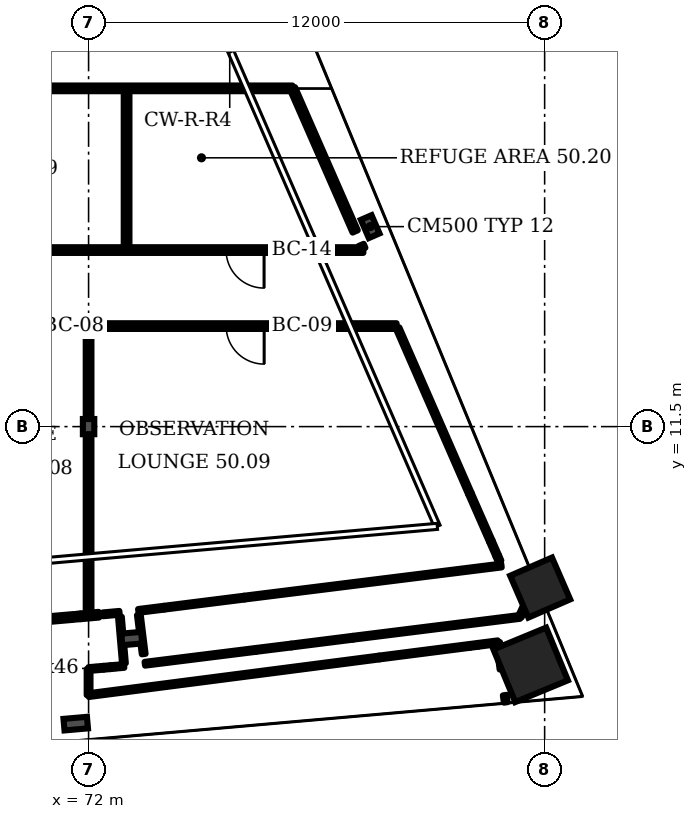
"""IFC4 building model, lengths in metres.
Left out: names, types, materials, properties, quantities, classifications, styles, units other than length and angle.
Written with IfcOpenShell. Run it as: python <this file> out.ifc"""

import sys

from ifc_helpers import new_model, si_unit, direction, frame, frame_2d, origin, origin_2d, place, context, subcontext, project, spatial, rectangle, i_section, extrude, element, fill, save


model = new_model("IFC4")
c1 = context("Model", 3, precision=1e-05, world=origin(), true_north=direction((0.0, 1.0)))
c2 = subcontext(c1, "Body", "Model", "MODEL_VIEW")
j1 = project(units=[si_unit("LENGTHUNIT", "METRE"), si_unit("PLANEANGLEUNIT", "RADIAN")], contexts=[c1])
p1 = place(None, origin())
s1 = spatial("IfcSite", under=j1, at=p1, CompositionType="ELEMENT")
p2 = place(p1, origin())
s2 = spatial("IfcBuilding", under=s1, at=p2, CompositionType="ELEMENT")
p3 = place(p2, frame((0.0, 0.0, 202.3)))
s3 = spatial("IfcBuildingStorey", under=s2, at=p3, CompositionType="ELEMENT", Elevation=202.3)
p4 = place(p3, frame((83.883, 7.265, 0.0), z_axis=(0.0, 0.0, 1.0), x_axis=(-0.398727, 0.917072, 0.0)))
e1 = element("IfcColumn", 1, at=p4, inside=s3, PredefinedType="COLUMN", context=c2, shape_type="SweptSolid", body=[
    extrude(rectangle(XDim=1.2, YDim=1.2, at=origin_2d()), origin(), (0.0, 0.0, 1.0), 4.8),
])
for number, where, z_axis, x_axis in (
    (2, (73.135, 5.923, 0.0), (0.0, 0.0, 1.0), (0.087, -0.996, 0.0)),
    (3, (79.41, 16.762, 0.0), (0.0, 0.0, 1.0), (0.917, 0.399, 0.0)),
):
    element("IfcColumn", number, at=place(p3, frame(where, z_axis=z_axis, x_axis=x_axis)), inside=s3, PredefinedType="COLUMN", context=c2, shape_type="SweptSolid", body=[
        extrude(i_section(OverallWidth=0.306, OverallDepth=0.524, WebThickness=0.021, FlangeThickness=0.04, FilletRadius=0.027, at=origin_2d()), origin(), (0.0, 0.0, 1.0), 4.8),
    ])
p5 = place(p3, frame((72.0, 11.5, 0.0), z_axis=(0.0, 0.0, 1.0), x_axis=(1.0, 0.0, 0.0)))
e4 = element("IfcColumn", 4, at=p5, inside=s3, PredefinedType="COLUMN", context=c2, shape_type="SweptSolid", body=[
    extrude(i_section(OverallWidth=0.3, OverallDepth=0.4, WebThickness=0.013, FlangeThickness=0.024, FilletRadius=0.027, at=origin_2d()), origin(), (0.0, 0.0, 1.0), 4.8),
])
p6 = place(p3, frame((83.633, 5.231, 0.0), z_axis=(0.0, 0.0, 1.0), x_axis=(-0.381602, 0.924325, 0.0)))
e5 = element("IfcColumn", 5, at=p6, inside=s3, PredefinedType="COLUMN", context=c2, shape_type="SweptSolid", body=[
    extrude(rectangle(XDim=1.5, YDim=1.5, at=origin_2d()), origin(), (0.0, 0.0, 1.0), 4.8),
])
p7 = place(p3, frame((71.662, 3.685, 0.0), z_axis=(0.0, 0.0, 1.0), x_axis=(0.087156, -0.996198, 0.0)))
e6 = element("IfcColumn", 6, at=p7, inside=s3, PredefinedType="COLUMN", context=c2, shape_type="SweptSolid", body=[
    extrude(i_section(OverallWidth=0.305, OverallDepth=0.62, WebThickness=0.021, FlangeThickness=0.04, FilletRadius=0.027, at=origin_2d()), origin(), (0.0, 0.0, 1.0), 4.8),
])
p8 = place(p3, frame((63.905, 16.145, 0.0), z_axis=(0.0, 0.0, 1.0), x_axis=(1.0, 0.0, 0.0)))
e7 = element("IfcWall", 7, at=p8, inside=s3, PredefinedType="PARTITIONING", context=c2, shape_type="SweptSolid", body=[
    extrude(rectangle(XDim=15.325, YDim=0.15, at=frame_2d((7.662, 0.0))), origin(), (0.0, 0.0, 1.0), 4.4),
])
p9 = place(p8, frame((1.795, 0.0, 0.0)))
e8 = element("IfcOpeningElement", 8, at=p9, cuts=e7, PredefinedType="OPENING", context=c2, shape_type="SweptSolid", body=[
    extrude(rectangle(XDim=1.0, YDim=2.1, at=frame_2d((0.5, 1.05))), frame((0.0, 0.085, 0.0), z_axis=(0.0, -1.0, 0.0), x_axis=(1.0, 0.0, 0.0)), (0.0, 0.0, 1.0), 0.17),
])
p10 = place(p8, frame((11.713, 0.0, 0.0)))
e9 = element("IfcOpeningElement", 9, at=p10, cuts=e7, PredefinedType="OPENING", context=c2, shape_type="SweptSolid", body=[
    extrude(rectangle(XDim=1.0, YDim=2.1, at=frame_2d((0.5, 1.05))), frame((0.0, 0.085, 0.0), z_axis=(0.0, -1.0, 0.0), x_axis=(1.0, 0.0, 0.0)), (0.0, 0.0, 1.0), 0.17),
])
p11 = place(p3, frame((63.905, 20.4, 0.0), z_axis=(0.0, 0.0, 1.0), x_axis=(1.0, 0.0, 0.0)))
e10 = element("IfcWall", 10, at=p11, inside=s3, PredefinedType="PARTITIONING", context=c2, shape_type="SweptSolid", body=[
    extrude(rectangle(XDim=13.46, YDim=0.15, at=frame_2d((6.73, 0.0))), origin(), (0.0, 0.0, 1.0), 4.4),
])
p12 = place(p3, frame((68.214, 14.145, 0.0), z_axis=(0.0, 0.0, 1.0), x_axis=(1.0, 0.0, 0.0)))
e11 = element("IfcWall", 11, at=p12, inside=s3, PredefinedType="PARTITIONING", context=c2, shape_type="SweptSolid", body=[
    extrude(rectangle(XDim=11.891, YDim=0.15, at=frame_2d((5.946, 0.0))), origin(), (0.0, 0.0, 1.0), 4.4),
])
p13 = place(p12, frame((1.401, 0.0, 0.0)))
e12 = element("IfcOpeningElement", 12, at=p13, cuts=e11, PredefinedType="OPENING", context=c2, shape_type="SweptSolid", body=[
    extrude(rectangle(XDim=1.0, YDim=2.1, at=frame_2d((0.5, 1.05))), frame((0.0, 0.085, 0.0), z_axis=(0.0, -1.0, 0.0), x_axis=(1.0, 0.0, 0.0)), (0.0, 0.0, 1.0), 0.17),
])
p14 = place(p12, frame((7.406, 0.0, 0.0)))
e13 = element("IfcOpeningElement", 13, at=p14, cuts=e11, PredefinedType="OPENING", context=c2, shape_type="SweptSolid", body=[
    extrude(rectangle(XDim=1.0, YDim=2.1, at=frame_2d((0.5, 1.05))), frame((0.0, 0.085, 0.0), z_axis=(0.0, -1.0, 0.0), x_axis=(1.0, 0.0, 0.0)), (0.0, 0.0, 1.0), 0.17),
])
p15 = place(p3, frame((70.489, 6.395, 0.0), z_axis=(0.0, 0.0, 1.0), x_axis=(0.996196, 0.087119, 0.0)))
e14 = element("IfcWall", 14, at=p15, inside=s3, PredefinedType="PARTITIONING", context=c2, shape_type="SweptSolid", body=[
    extrude(rectangle(XDim=1.141, YDim=0.15, at=frame_2d((0.57, 0.0))), origin(), (0.0, 0.0, 1.0), 4.4),
])
p16 = place(p3, frame((71.68, 6.5, 0.0), z_axis=(0.0, 0.0, 1.0), x_axis=(0.997064, 0.076524, 0.0)))
e15 = element("IfcWall", 15, at=p16, inside=s3, PredefinedType="PARTITIONING", context=c2, shape_type="SweptSolid", body=[
    extrude(rectangle(XDim=0.108, YDim=0.15, at=frame_2d((0.054, 0.0))), origin(), (0.0, 0.0, 1.0), 4.4),
])
p17 = place(p3, frame((71.788, 6.508, 0.0), z_axis=(0.0, 0.0, 1.0), x_axis=(0.996212, 0.086911, 0.0)))
e16 = element("IfcWall", 16, at=p17, inside=s3, PredefinedType="PARTITIONING", context=c2, shape_type="SweptSolid", body=[
    extrude(rectangle(XDim=0.486, YDim=0.15, at=frame_2d((0.243, 0.0))), origin(), (0.0, 0.0, 1.0), 4.4),
])
p18 = place(p3, frame((72.0, 4.435, 0.0), z_axis=(0.0, 0.0, 1.0), x_axis=(0.991735, 0.128315, 0.0)))
e17 = element("IfcWall", 17, at=p18, inside=s3, PredefinedType="PARTITIONING", context=c2, shape_type="SweptSolid", body=[
    extrude(rectangle(XDim=7.713, YDim=0.1, at=frame_2d((3.857, 0.0))), origin(), (0.0, 0.0, 1.0), 4.4),
])
p19 = place(p3, frame((72.0, 4.435, 0.0), z_axis=(0.0, 0.0, 1.0), x_axis=(0.0, 1.0, 0.0)))
e18 = element("IfcWall", 18, at=p19, inside=s3, PredefinedType="PARTITIONING", context=c2, shape_type="SweptSolid", body=[
    extrude(rectangle(XDim=0.685, YDim=0.1, at=frame_2d((0.343, 0.0))), origin(), (0.0, 0.0, 1.0), 4.4),
])
p20 = place(p3, frame((72.0, 5.12, 0.0), z_axis=(0.0, 0.0, 1.0), x_axis=(0.996121, 0.088038, 0.0)))
e19 = element("IfcWall", 19, at=p20, inside=s3, PredefinedType="PARTITIONING", context=c2, shape_type="SweptSolid", body=[
    extrude(rectangle(XDim=0.396, YDim=0.1, at=frame_2d((0.198, 0.0))), origin(), (0.0, 0.0, 1.0), 4.4),
])
p21 = place(p3, frame((72.0, 6.527, 0.0), z_axis=(0.0, 0.0, 1.0), x_axis=(0.0, 1.0, 0.0)))
e20 = element("IfcWall", 20, at=p21, inside=s3, PredefinedType="PARTITIONING", context=c2, shape_type="SweptSolid", body=[
    extrude(rectangle(XDim=7.618, YDim=0.15, at=frame_2d((3.809, 0.0))), origin(), (0.0, 0.0, 1.0), 4.4),
])
p22 = place(p3, frame((72.375, 6.56, 0.0), z_axis=(0.0, 0.0, 1.0), x_axis=(0.99588, 0.090635, 0.0)))
e21 = element("IfcWall", 21, at=p22, inside=s3, PredefinedType="PARTITIONING", context=c2, shape_type="SweptSolid", body=[
    extrude(rectangle(XDim=0.442, YDim=0.1, at=frame_2d((0.221, 0.0))), origin(), (0.0, 0.0, 1.0), 4.4),
])
p23 = place(p3, frame((72.395, 5.155, 0.0), z_axis=(0.0, 0.0, 1.0), x_axis=(0.996593, 0.082486, 0.0)))
e22 = element("IfcWall", 22, at=p23, inside=s3, PredefinedType="PARTITIONING", context=c2, shape_type="SweptSolid", body=[
    extrude(rectangle(XDim=0.181, YDim=0.1, at=frame_2d((0.09, 0.0))), origin(), (0.0, 0.0, 1.0), 4.4),
])
p24 = place(p3, frame((72.575, 5.17, 0.0), z_axis=(0.0, 0.0, 1.0), x_axis=(0.996069, 0.088603, 0.0)))
e23 = element("IfcWall", 23, at=p24, inside=s3, PredefinedType="PARTITIONING", context=c2, shape_type="SweptSolid", body=[
    extrude(rectangle(XDim=0.171, YDim=0.1, at=frame_2d((0.085, 0.0))), origin(), (0.0, 0.0, 1.0), 4.4),
])
p25 = place(p3, frame((72.796, 5.191, 0.0), z_axis=(0.0, 0.0, 1.0), x_axis=(0.996205, 0.087081, 0.0)))
e24 = element("IfcWall", 24, at=p25, inside=s3, PredefinedType="PARTITIONING", context=c2, shape_type="SweptSolid", body=[
    extrude(rectangle(XDim=0.14, YDim=0.1, at=frame_2d((0.07, 0.0))), origin(), (0.0, 0.0, 1.0), 4.4),
])
p26 = place(p3, frame((72.93, 5.27, 0.0), z_axis=(0.0, 0.0, 1.0), x_axis=(-0.085711, 0.996316, 0.0)))
e25 = element("IfcWall", 25, at=p26, inside=s3, PredefinedType="PARTITIONING", context=c2, shape_type="SweptSolid", body=[
    extrude(rectangle(XDim=1.228, YDim=0.1, at=frame_2d((0.614, 0.0))), origin(), (0.0, 0.0, 1.0), 4.4),
])
p27 = place(p3, frame((73.0, 16.145, 0.0), z_axis=(0.0, 0.0, 1.0), x_axis=(0.0, 1.0, 0.0)))
e26 = element("IfcWall", 26, at=p27, inside=s3, PredefinedType="PARTITIONING", context=c2, shape_type="SweptSolid", body=[
    extrude(rectangle(XDim=4.255, YDim=0.15, at=frame_2d((2.127, 0.0))), origin(), (0.0, 0.0, 1.0), 4.4),
])
p28 = place(p3, frame((73.309, 6.65, 0.0), z_axis=(0.0, 0.0, 1.0), x_axis=(0.99228, 0.124035, 0.0)))
e27 = element("IfcWall", 27, at=p28, inside=s3, PredefinedType="PARTITIONING", context=c2, shape_type="SweptSolid", body=[
    extrude(rectangle(XDim=0.679, YDim=0.1, at=frame_2d((0.339, 0.0))), origin(), (0.0, 0.0, 1.0), 4.4),
])
p29 = place(p3, frame((73.45, 5.515, 0.0), z_axis=(0.0, 0.0, 1.0), x_axis=(-0.122241, 0.992503, 0.0)))
e28 = element("IfcWall", 28, at=p29, inside=s3, PredefinedType="PARTITIONING", context=c2, shape_type="SweptSolid", body=[
    extrude(rectangle(XDim=1.039, YDim=0.1, at=frame_2d((0.519, 0.0))), origin(), (0.0, 0.0, 1.0), 4.4),
])
p30 = place(p3, frame((73.48, 5.26, 0.0), z_axis=(0.0, 0.0, 1.0), x_axis=(0.992307, 0.123821, 0.0)))
e29 = element("IfcWall", 29, at=p30, inside=s3, PredefinedType="PARTITIONING", context=c2, shape_type="SweptSolid", body=[
    extrude(rectangle(XDim=2.948, YDim=0.1, at=frame_2d((1.474, 0.0))), origin(), (0.0, 0.0, 1.0), 4.4),
])
p31 = place(p3, frame((73.983, 6.735, 0.0), z_axis=(0.0, 0.0, 1.0), x_axis=(0.992202, 0.124656, 0.0)))
e30 = element("IfcWall", 30, at=p31, inside=s3, PredefinedType="PARTITIONING", context=c2, shape_type="SweptSolid", body=[
    extrude(rectangle(XDim=2.129, YDim=0.1, at=frame_2d((1.064, 0.0))), origin(), (0.0, 0.0, 1.0), 4.4),
])
p32 = place(p3, frame((76.095, 7.0, 0.0), z_axis=(0.0, 0.0, 1.0), x_axis=(0.992304, 0.123792, 0.0)))
e31 = element("IfcWall", 31, at=p32, inside=s3, PredefinedType="PARTITIONING", context=c2, shape_type="SweptSolid", body=[
    extrude(rectangle(XDim=6.822, YDim=0.1, at=frame_2d((3.411, 0.0))), origin(), (0.0, 0.0, 1.0), 4.4),
])
p33 = place(p3, frame((76.405, 5.625, 0.0), z_axis=(0.0, 0.0, 1.0), x_axis=(0.992443, 0.12272, 0.0)))
e32 = element("IfcWall", 32, at=p33, inside=s3, PredefinedType="PARTITIONING", context=c2, shape_type="SweptSolid", body=[
    extrude(rectangle(XDim=0.937, YDim=0.1, at=frame_2d((0.469, 0.0))), origin(), (0.0, 0.0, 1.0), 4.4),
])
p34 = place(p3, frame((77.335, 5.74, 0.0), z_axis=(0.0, 0.0, 1.0), x_axis=(0.992138, 0.125156, 0.0)))
e33 = element("IfcWall", 33, at=p34, inside=s3, PredefinedType="PARTITIONING", context=c2, shape_type="SweptSolid", body=[
    extrude(rectangle(XDim=1.635, YDim=0.1, at=frame_2d((0.817, 0.0))), origin(), (0.0, 0.0, 1.0), 4.4),
])
p35 = place(p3, frame((78.957, 5.945, 0.0), z_axis=(0.0, 0.0, 1.0), x_axis=(0.992303, 0.123831, 0.0)))
e34 = element("IfcWall", 34, at=p35, inside=s3, PredefinedType="PARTITIONING", context=c2, shape_type="SweptSolid", body=[
    extrude(rectangle(XDim=4.426, YDim=0.1, at=frame_2d((2.213, 0.0))), origin(), (0.0, 0.0, 1.0), 4.4),
])
p36 = place(p3, frame((79.015, 16.635, 0.0), z_axis=(0.0, 0.0, 1.0), x_axis=(-0.401383, 0.915911, 0.0)))
e35 = element("IfcWall", 35, at=p36, inside=s3, PredefinedType="PARTITIONING", context=c2, shape_type="SweptSolid", body=[
    extrude(rectangle(XDim=4.111, YDim=0.15, at=frame_2d((2.055, 0.0))), origin(), (0.0, 0.0, 1.0), 4.4),
])
p37 = place(p3, frame((79.215, 16.175, 0.0), z_axis=(0.0, 0.0, 1.0), x_axis=(-0.395209, 0.918594, 0.0)))
e36 = element("IfcWall", 36, at=p37, inside=s3, PredefinedType="PARTITIONING", context=c2, shape_type="SweptSolid", body=[
    extrude(rectangle(XDim=0.114, YDim=0.15, at=frame_2d((0.057, 0.0))), origin(), (0.0, 0.0, 1.0), 4.4),
])
p38 = place(p3, frame((79.65, 5.425, 0.0), z_axis=(0.0, 0.0, 1.0), x_axis=(0.991892, 0.127077, 0.0)))
e37 = element("IfcWall", 37, at=p38, inside=s3, PredefinedType="PARTITIONING", context=c2, shape_type="SweptSolid", body=[
    extrude(rectangle(XDim=2.4, YDim=0.1, at=frame_2d((1.2, 0.0))), origin(), (0.0, 0.0, 1.0), 4.4),
])
p39 = place(p3, frame((82.03, 5.73, 0.0), z_axis=(0.0, 0.0, 1.0), x_axis=(0.991935, 0.126723, 0.0)))
e38 = element("IfcWall", 38, at=p39, inside=s3, PredefinedType="PARTITIONING", context=c2, shape_type="SweptSolid", body=[
    extrude(rectangle(XDim=0.223, YDim=0.1, at=frame_2d((0.112, 0.0))), origin(), (0.0, 0.0, 1.0), 4.4),
])
p40 = place(p3, frame((82.03, 9.745, 0.0), z_axis=(0.0, 0.0, 1.0), x_axis=(-0.400291, 0.916392, 0.0)))
e39 = element("IfcWall", 39, at=p40, inside=s3, PredefinedType="PARTITIONING", context=c2, shape_type="SweptSolid", body=[
    extrude(rectangle(XDim=4.743, YDim=0.1, at=frame_2d((2.372, 0.0))), origin(), (0.0, 0.0, 1.0), 4.4),
])
p41 = place(p3, frame((82.252, 5.758, 0.0), z_axis=(0.0, 0.0, 1.0), x_axis=(0.991798, 0.127809, 0.0)))
e40 = element("IfcWall", 40, at=p41, inside=s3, PredefinedType="PARTITIONING", context=c2, shape_type="SweptSolid", body=[
    extrude(rectangle(XDim=0.525, YDim=0.1, at=frame_2d((0.263, 0.0))), origin(), (0.0, 0.0, 1.0), 4.4),
])
p42 = place(p3, frame((82.583, 8.488, 0.0), z_axis=(0.0, 0.0, 1.0), x_axis=(-0.402589, 0.915379, 0.0)))
e41 = element("IfcWall", 41, at=p42, inside=s3, PredefinedType="PARTITIONING", context=c2, shape_type="SweptSolid", body=[
    extrude(rectangle(XDim=1.374, YDim=0.1, at=frame_2d((0.687, 0.0))), origin(), (0.0, 0.0, 1.0), 4.4),
])
p43 = place(p3, frame((82.754, 8.097, 0.0), z_axis=(0.0, 0.0, 1.0), x_axis=(-0.40103, 0.916067, 0.0)))
e42 = element("IfcWall", 42, at=p43, inside=s3, PredefinedType="PARTITIONING", context=c2, shape_type="SweptSolid", body=[
    extrude(rectangle(XDim=0.426, YDim=0.1, at=frame_2d((0.213, 0.0))), origin(), (0.0, 0.0, 1.0), 4.4),
])
p44 = place(p3, frame((82.815, 7.955, 0.0), z_axis=(0.0, 0.0, 1.0), x_axis=(-0.394108, 0.91906, 0.0)))
e43 = element("IfcWall", 43, at=p44, inside=s3, PredefinedType="PARTITIONING", context=c2, shape_type="SweptSolid", body=[
    extrude(rectangle(XDim=0.155, YDim=0.1, at=frame_2d((0.077, 0.0))), origin(), (0.0, 0.0, 1.0), 4.4),
])
p45 = place(p3, frame((82.865, 5.115, 0.0), z_axis=(0.0, 0.0, 1.0), x_axis=(-0.125882, 0.992046, 0.0)))
e44 = element("IfcWall", 44, at=p45, inside=s3, PredefinedType="PARTITIONING", context=c2, shape_type="SweptSolid", body=[
    extrude(rectangle(XDim=0.716, YDim=0.1, at=frame_2d((0.358, 0.0))), origin(), (0.0, 0.0, 1.0), 4.4),
])
p46 = place(p3, frame((82.977, 4.243, 0.0), z_axis=(0.0, 0.0, 1.0), x_axis=(-0.141069, 0.990002, 0.0)))
e45 = element("IfcWall", 45, at=p46, inside=s3, PredefinedType="PARTITIONING", context=c2, shape_type="SweptSolid", body=[
    extrude(rectangle(XDim=0.194, YDim=0.1, at=frame_2d((0.097, 0.0))), origin(), (0.0, 0.0, 1.0), 4.4),
])
p47 = place(p3, frame((83.35, 6.5, 0.0), z_axis=(0.0, 0.0, 1.0), x_axis=(0.420495, 0.90729, 0.0)))
e46 = element("IfcWall", 46, at=p47, inside=s3, PredefinedType="PARTITIONING", context=c2, shape_type="SweptSolid", body=[
    extrude(rectangle(XDim=0.958, YDim=0.1, at=frame_2d((0.479, 0.0))), origin(), (0.0, 0.0, 1.0), 4.4),
])
p48 = place(p14, origin())
e47 = element("IfcDoor", 47, at=p48, inside=s3, OperationType="SINGLE_SWING_RIGHT", PredefinedType="DOOR", context=c2, shape_type="SweptSolid", body=[
    extrude(rectangle(XDim=1.0, YDim=2.1, at=frame_2d((0.5, 1.05))), frame((0.0, 0.025, 0.0), z_axis=(0.0, -1.0, 0.0), x_axis=(1.0, 0.0, 0.0)), (0.0, 0.0, 1.0), 0.05),
])
fill(e13, e47)
p49 = place(p10, origin())
e48 = element("IfcDoor", 48, at=p49, inside=s3, OperationType="SINGLE_SWING_RIGHT", PredefinedType="DOOR", context=c2, shape_type="SweptSolid", body=[
    extrude(rectangle(XDim=1.0, YDim=2.1, at=frame_2d((0.5, 1.05))), frame((0.0, 0.025, 0.0), z_axis=(0.0, -1.0, 0.0), x_axis=(1.0, 0.0, 0.0)), (0.0, 0.0, 1.0), 0.05),
])
fill(e9, e48)
save(model, sys.argv[1])
